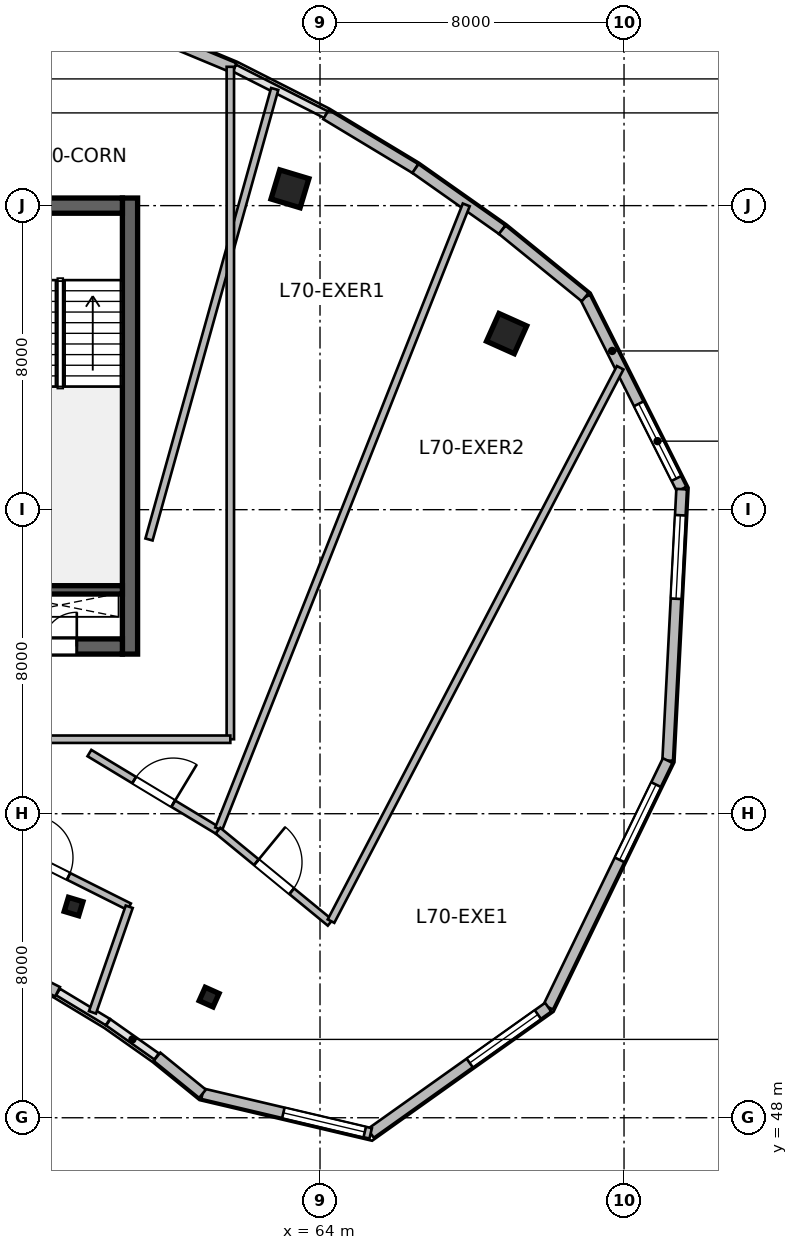
"""IFC4 building model, lengths in metres.
Left out: names, types, materials, properties, quantities, classifications, styles, units other than length and angle.
Written with IfcOpenShell. Run it as: python <this file> out.ifc"""

import sys

from ifc_helpers import new_model, si_unit, direction, frame, frame_2d, origin, origin_2d, place, context, subcontext, project, spatial, rectangle, i_section, extrude, source, transform, mapped, element, fill, save


model = new_model("IFC4")
c1 = context("Model", 3, precision=1e-05, world=origin(), true_north=direction((0.0, 1.0)))
c2 = subcontext(c1, "Body", "Model", "MODEL_VIEW")
j1 = project(units=[si_unit("LENGTHUNIT", "METRE"), si_unit("PLANEANGLEUNIT", "RADIAN")], contexts=[c1])
p1 = place(None, origin())
s1 = spatial("IfcSite", under=j1, at=p1, CompositionType="ELEMENT")
p2 = place(p1, origin())
s2 = spatial("IfcBuilding", under=s1, at=p2, CompositionType="ELEMENT")
p3 = place(p2, frame((0.0, 0.0, 287.4)))
s3 = spatial("IfcBuildingStorey", under=s2, at=p3, CompositionType="ELEMENT", Elevation=287.4)
m1 = source(origin(), c2, "Body", "SweptSolid", [
    extrude(rectangle(XDim=12.0, YDim=0.4, at=frame_2d((6.0, 0.0))), origin(), (0.0, 0.0, 1.0), 3.9),
])
p4 = place(p3, frame((59.0, 60.2, 0.0), z_axis=(0.0, 0.0, 1.0), x_axis=(0.0, 1.0, 0.0)))
e1 = element("IfcWall", 1, at=p4, inside=s3, PredefinedType="SHEAR", context=c2, shape_type="MappedRepresentation", body=[
    mapped(m1, transform((0.0, 0.0, 0.0), scale=1.0)),
])
m2 = source(origin(), c2, "Body", "SweptSolid", [
    extrude(rectangle(XDim=21.6, YDim=0.4, at=frame_2d((10.8, 0.0))), origin(), (0.0, 0.0, 1.0), 3.9),
])
p5 = place(p3, frame((37.2, 60.4, 0.0), z_axis=(0.0, 0.0, 1.0), x_axis=(1.0, 0.0, 0.0)))
e2 = element("IfcWall", 2, at=p5, inside=s3, PredefinedType="SHEAR", context=c2, shape_type="MappedRepresentation", body=[
    mapped(m2, transform((0.0, 0.0, 0.0), scale=1.0)),
])
p6 = place(p5, frame((1.1, 0.0, 0.0)))
e3 = element("IfcOpeningElement", 3, at=p6, cuts=e2, PredefinedType="OPENING", context=c2, shape_type="SweptSolid", body=[
    extrude(rectangle(XDim=1.15, YDim=2.15, at=frame_2d((0.575, 1.075))), frame((0.0, 0.21, 0.0), z_axis=(0.0, -1.0, 0.0), x_axis=(1.0, 0.0, 0.0)), (0.0, 0.0, 1.0), 0.42),
])
p7 = place(p5, frame((19.5, 0.0, 0.0)))
e4 = element("IfcOpeningElement", 4, at=p7, cuts=e2, PredefinedType="OPENING", context=c2, shape_type="SweptSolid", body=[
    extrude(rectangle(XDim=0.9, YDim=2.1, at=frame_2d((0.45, 1.05))), frame((0.0, 0.21, 0.0), z_axis=(0.0, -1.0, 0.0), x_axis=(1.0, 0.0, 0.0)), (0.0, 0.0, 1.0), 0.42),
])
p8 = place(p5, frame((12.02, 0.0, 0.0)))
e5 = element("IfcOpeningElement", 5, at=p8, cuts=e2, PredefinedType="OPENING", context=c2, shape_type="SweptSolid", body=[
    extrude(rectangle(XDim=1.6, YDim=2.15, at=frame_2d((0.8, 1.075))), frame((0.0, 0.21, 0.0), z_axis=(0.0, -1.0, 0.0), x_axis=(1.0, 0.0, 0.0)), (0.0, 0.0, 1.0), 0.42),
])
p9 = place(p3, frame((37.2, 72.0, 0.0), z_axis=(0.0, 0.0, 1.0), x_axis=(1.0, 0.0, 0.0)))
e6 = element("IfcWall", 6, at=p9, inside=s3, PredefinedType="SHEAR", context=c2, shape_type="MappedRepresentation", body=[
    mapped(m2, transform((0.0, 0.0, 0.0), scale=1.0)),
])
p10 = place(p9, frame((1.2, 0.0, 0.0)))
e7 = element("IfcOpeningElement", 7, at=p10, cuts=e6, PredefinedType="OPENING", context=c2, shape_type="SweptSolid", body=[
    extrude(rectangle(XDim=0.9, YDim=2.1, at=frame_2d((0.45, 1.05))), frame((0.0, 0.21, 0.0), z_axis=(0.0, -1.0, 0.0), x_axis=(1.0, 0.0, 0.0)), (0.0, 0.0, 1.0), 0.42),
])
p11 = place(p9, frame((14.7, 0.0, 0.0)))
e8 = element("IfcOpeningElement", 8, at=p11, cuts=e6, PredefinedType="OPENING", context=c2, shape_type="SweptSolid", body=[
    extrude(rectangle(XDim=1.2, YDim=2.15, at=frame_2d((0.6, 1.075))), frame((0.0, 0.21, 0.0), z_axis=(0.0, -1.0, 0.0), x_axis=(1.0, 0.0, 0.0)), (0.0, 0.0, 1.0), 0.42),
])
p12 = place(p9, frame((4.15, 0.0, 0.0)))
e9 = element("IfcOpeningElement", 9, at=p12, cuts=e6, PredefinedType="OPENING", context=c2, shape_type="SweptSolid", body=[
    extrude(rectangle(XDim=1.3, YDim=2.15, at=frame_2d((0.65, 1.075))), frame((0.0, 0.21, 0.0), z_axis=(0.0, -1.0, 0.0), x_axis=(1.0, 0.0, 0.0)), (0.0, 0.0, 1.0), 0.42),
])
p13 = place(p9, frame((7.1, 0.0, 0.0)))
e10 = element("IfcOpeningElement", 10, at=p13, cuts=e6, PredefinedType="OPENING", context=c2, shape_type="SweptSolid", body=[
    extrude(rectangle(XDim=0.9, YDim=2.1, at=frame_2d((0.45, 1.05))), frame((0.0, 0.21, 0.0), z_axis=(0.0, -1.0, 0.0), x_axis=(1.0, 0.0, 0.0)), (0.0, 0.0, 1.0), 0.42),
])
m3 = source(origin(), c2, "Body", "SweptSolid", [
    extrude(rectangle(XDim=3.27, YDim=0.22, at=frame_2d((1.635, 0.0))), origin(), (0.0, 0.0, 1.0), 3.9),
])
p14 = place(p3, frame((55.53, 61.89, 0.0), z_axis=(0.0, 0.0, 1.0), x_axis=(1.0, 0.0, 0.0)))
e11 = element("IfcWall", 11, at=p14, inside=s3, PredefinedType="SHEAR", context=c2, shape_type="MappedRepresentation", body=[
    mapped(m3, transform((0.0, 0.0, 0.0), scale=1.0)),
])
m4 = source(origin(), c2, "Body", "SweptSolid", [
    extrude(i_section(OverallWidth=0.399, OverallDepth=0.387, WebThickness=0.021, FlangeThickness=0.033, at=origin_2d()), origin(), (0.0, 0.0, 1.0), 3.9),
])
p15 = place(p3, frame((57.515, 53.558, 0.0), z_axis=(0.0, 0.0, 1.0), x_axis=(0.288697611798, 0.957420330337, 0.0)))
e12 = element("IfcColumn", 12, at=p15, inside=s3, PredefinedType="COLUMN", context=c2, shape_type="MappedRepresentation", body=[
    mapped(m4, transform((0.0, 0.0, 0.0), scale=1.0)),
])
m5 = source(origin(), c2, "Body", "SweptSolid", [
    extrude(rectangle(XDim=0.8, YDim=0.8, at=origin_2d()), origin(), (0.0, 0.0, 1.0), 3.9),
])
p16 = place(p3, frame((63.209, 72.442, 0.0), z_axis=(0.0, 0.0, 1.0), x_axis=(0.288697611798, 0.957420330337, 0.0)))
e13 = element("IfcColumn", 13, at=p16, inside=s3, PredefinedType="COLUMN", context=c2, shape_type="MappedRepresentation", body=[
    mapped(m5, transform((0.0, 0.0, 0.0), scale=1.0)),
])
p17 = place(p3, frame((61.082, 51.175, 0.0), z_axis=(0.0, 0.0, 1.0), x_axis=(0.409126902895, 0.912477494148, 0.0)))
e14 = element("IfcColumn", 14, at=p17, inside=s3, PredefinedType="COLUMN", context=c2, shape_type="MappedRepresentation", body=[
    mapped(m4, transform((0.0, 0.0, 0.0), scale=1.0)),
])
p18 = place(p3, frame((68.91, 68.633, 0.0), z_axis=(0.0, 0.0, 1.0), x_axis=(0.409126902895, 0.912477494148, 0.0)))
e15 = element("IfcColumn", 15, at=p18, inside=s3, PredefinedType="COLUMN", context=c2, shape_type="MappedRepresentation", body=[
    mapped(m5, transform((0.0, 0.0, 0.0), scale=1.0)),
])
m6 = source(origin(), c2, "Body", "SweptSolid", [
    extrude(rectangle(XDim=5.653, YDim=0.28, at=frame_2d((2.827, 0.0))), origin(), (0.0, 0.0, 1.0), 3.64),
])
p19 = place(p3, frame((70.976, 69.591, 0.0), z_axis=(0.0, 0.0, 1.0), x_axis=(0.449302555419, -0.893379658205, 0.0)))
e16 = element("IfcWall", 16, at=p19, inside=s3, PredefinedType="SOLIDWALL", context=c2, shape_type="MappedRepresentation", body=[
    mapped(m6, transform((0.0, 0.0, 0.0), scale=1.0)),
])
p20 = place(p19, frame((3.14, 0.0, 0.95)))
e17 = element("IfcOpeningElement", 17, at=p20, cuts=e16, PredefinedType="OPENING", context=c2, shape_type="SweptSolid", body=[
    extrude(rectangle(XDim=2.2, YDim=2.1, at=frame_2d((1.1, 1.05))), frame((0.0, 0.15, 0.0), z_axis=(0.0, -1.0, 0.0), x_axis=(1.0, 0.0, 0.0)), (0.0, 0.0, 1.0), 0.3),
])
m7 = source(origin(), c2, "Body", "SweptSolid", [
    extrude(rectangle(XDim=7.151, YDim=0.28, at=frame_2d((3.576, 0.0))), origin(), (0.0, 0.0, 1.0), 3.64),
])
p21 = place(p3, frame((73.516, 64.54, 0.0), z_axis=(0.0, 0.0, 1.0), x_axis=(-0.051449614265, -0.998675591567, 0.0)))
e18 = element("IfcWall", 18, at=p21, inside=s3, PredefinedType="SOLIDWALL", context=c2, shape_type="MappedRepresentation", body=[
    mapped(m7, transform((0.0, 0.0, 0.0), scale=1.0)),
])
p22 = place(p21, frame((0.688, 0.0, 0.95)))
e19 = element("IfcOpeningElement", 19, at=p22, cuts=e18, PredefinedType="OPENING", context=c2, shape_type="SweptSolid", body=[
    extrude(rectangle(XDim=2.2, YDim=2.1, at=frame_2d((1.1, 1.05))), frame((0.0, 0.15, 0.0), z_axis=(0.0, -1.0, 0.0), x_axis=(1.0, 0.0, 0.0)), (0.0, 0.0, 1.0), 0.3),
])
m8 = source(origin(), c2, "Body", "SweptSolid", [
    extrude(rectangle(XDim=7.211, YDim=0.28, at=frame_2d((3.606, 0.0))), origin(), (0.0, 0.0, 1.0), 3.64),
])
p23 = place(p3, frame((73.148, 57.399, 0.0), z_axis=(0.0, 0.0, 1.0), x_axis=(-0.436088263006, -0.899903898685, 0.0)))
e20 = element("IfcWall", 20, at=p23, inside=s3, PredefinedType="SOLIDWALL", context=c2, shape_type="MappedRepresentation", body=[
    mapped(m8, transform((0.0, 0.0, 0.0), scale=1.0)),
])
p24 = place(p23, frame((0.703, 0.0, 0.95)))
e21 = element("IfcOpeningElement", 21, at=p24, cuts=e20, PredefinedType="OPENING", context=c2, shape_type="SweptSolid", body=[
    extrude(rectangle(XDim=2.2, YDim=2.1, at=frame_2d((1.1, 1.05))), frame((0.0, 0.15, 0.0), z_axis=(0.0, -1.0, 0.0), x_axis=(1.0, 0.0, 0.0)), (0.0, 0.0, 1.0), 0.3),
])
m9 = source(origin(), c2, "Body", "SweptSolid", [
    extrude(rectangle(XDim=5.731, YDim=0.28, at=frame_2d((2.865, 0.0))), origin(), (0.0, 0.0, 1.0), 3.64),
])
p25 = place(p3, frame((70.004, 50.909, 0.0), z_axis=(0.0, 0.0, 1.0), x_axis=(-0.815021045908, -0.579431354629, 0.0)))
e22 = element("IfcWall", 22, at=p25, inside=s3, PredefinedType="SOLIDWALL", context=c2, shape_type="MappedRepresentation", body=[
    mapped(m9, transform((0.0, 0.0, 0.0), scale=1.0)),
])
p26 = place(p25, frame((0.333, 0.0, 0.95)))
e23 = element("IfcOpeningElement", 23, at=p26, cuts=e22, PredefinedType="OPENING", context=c2, shape_type="SweptSolid", body=[
    extrude(rectangle(XDim=2.2, YDim=2.1, at=frame_2d((1.1, 1.05))), frame((0.0, 0.15, 0.0), z_axis=(0.0, -1.0, 0.0), x_axis=(1.0, 0.0, 0.0)), (0.0, 0.0, 1.0), 0.3),
])
m10 = source(origin(), c2, "Body", "SweptSolid", [
    extrude(rectangle(XDim=4.547, YDim=0.28, at=frame_2d((2.273, 0.0))), origin(), (0.0, 0.0, 1.0), 3.64),
])
p27 = place(p3, frame((65.333, 47.589, 0.0), z_axis=(0.0, 0.0, 1.0), x_axis=(-0.973332593516, 0.229398479505, 0.0)))
e24 = element("IfcWall", 24, at=p27, inside=s3, PredefinedType="SOLIDWALL", context=c2, shape_type="MappedRepresentation", body=[
    mapped(m10, transform((0.0, 0.0, 0.0), scale=1.0)),
])
p28 = place(p27, frame((0.16, 0.0, 0.95)))
e25 = element("IfcOpeningElement", 25, at=p28, cuts=e24, PredefinedType="OPENING", context=c2, shape_type="SweptSolid", body=[
    extrude(rectangle(XDim=2.2, YDim=2.1, at=frame_2d((1.1, 1.05))), frame((0.0, 0.15, 0.0), z_axis=(0.0, -1.0, 0.0), x_axis=(1.0, 0.0, 0.0)), (0.0, 0.0, 1.0), 0.3),
])
m11 = source(origin(), c2, "Body", "SweptSolid", [
    extrude(rectangle(XDim=1.543, YDim=0.28, at=frame_2d((0.772, 0.0))), origin(), (0.0, 0.0, 1.0), 3.64),
])
p29 = place(p3, frame((60.908, 48.632, 0.0), z_axis=(0.0, 0.0, 1.0), x_axis=(-0.77582846857, 0.63094388606, 0.0)))
e26 = element("IfcWall", 26, at=p29, inside=s3, PredefinedType="SOLIDWALL", context=c2, shape_type="MappedRepresentation", body=[
    mapped(m11, transform((0.0, 0.0, 0.0), scale=1.0)),
])
m12 = source(origin(), c2, "Body", "SweptSolid", [
    extrude(rectangle(XDim=1.509, YDim=0.28, at=frame_2d((0.754, 0.0))), origin(), (0.0, 0.0, 1.0), 3.64),
])
p30 = place(p3, frame((57.094, 51.315, 0.0), z_axis=(0.0, 0.0, 1.0), x_axis=(-0.89169189228, 0.452642871635, 0.0)))
e27 = element("IfcWall", 27, at=p30, inside=s3, PredefinedType="SOLIDWALL", context=c2, shape_type="MappedRepresentation", body=[
    mapped(m12, transform((0.0, 0.0, 0.0), scale=1.0)),
])
m13 = source(origin(), c2, "Body", "SweptSolid", [
    extrude(rectangle(XDim=2.668, YDim=0.28, at=frame_2d((1.334, 0.0))), origin(), (0.0, 0.0, 1.0), 3.64),
])
p31 = place(p3, frame((59.281, 76.645, 0.0), z_axis=(0.0, 0.0, 1.0), x_axis=(0.923290633029, -0.384102078828, 0.0)))
e28 = element("IfcWall", 28, at=p31, inside=s3, PredefinedType="SOLIDWALL", context=c2, shape_type="MappedRepresentation", body=[
    mapped(m13, transform((0.0, 0.0, 0.0), scale=1.0)),
])
m14 = source(origin(), c2, "Body", "SweptSolid", [
    extrude(rectangle(XDim=2.748, YDim=0.28, at=frame_2d((1.374, 0.0))), origin(), (0.0, 0.0, 1.0), 3.64),
])
p32 = place(p3, frame((64.157, 74.396, 0.0), z_axis=(0.0, 0.0, 1.0), x_axis=(0.856149718453, -0.516727838996, 0.0)))
e29 = element("IfcWall", 29, at=p32, inside=s3, PredefinedType="SOLIDWALL", context=c2, shape_type="MappedRepresentation", body=[
    mapped(m14, transform((0.0, 0.0, 0.0), scale=1.0)),
])
m15 = source(origin(), c2, "Body", "SweptSolid", [
    extrude(rectangle(XDim=2.795, YDim=0.28, at=frame_2d((1.397, 0.0))), origin(), (0.0, 0.0, 1.0), 3.64),
])
p33 = place(p3, frame((66.51, 72.975, 0.0), z_axis=(0.0, 0.0, 1.0), x_axis=(0.817265517835, -0.576261289136, 0.0)))
e30 = element("IfcWall", 30, at=p33, inside=s3, PredefinedType="SOLIDWALL", context=c2, shape_type="MappedRepresentation", body=[
    mapped(m15, transform((0.0, 0.0, 0.0), scale=1.0)),
])
m16 = source(origin(), c2, "Body", "SweptSolid", [
    extrude(rectangle(XDim=2.812, YDim=0.28, at=frame_2d((1.406, 0.0))), origin(), (0.0, 0.0, 1.0), 3.64),
])
p34 = place(p3, frame((68.795, 71.365, 0.0), z_axis=(0.0, 0.0, 1.0), x_axis=(0.775880230716, -0.630880232361, 0.0)))
e31 = element("IfcWall", 31, at=p34, inside=s3, PredefinedType="SOLIDWALL", context=c2, shape_type="MappedRepresentation", body=[
    mapped(m16, transform((0.0, 0.0, 0.0), scale=1.0)),
])
m17 = source(origin(), c2, "Body", "SweptSolid", [
    extrude(rectangle(XDim=4.271, YDim=0.195, at=frame_2d((2.135, 0.0))), origin(), (0.0, 0.0, 1.0), 3.64),
])
p35 = place(p3, frame((55.161, 55.465, 0.0), z_axis=(0.0, 0.0, 1.0), x_axis=(0.894061035522, -0.447945158207, 0.0)))
e32 = element("IfcWall", 32, at=p35, inside=s3, PredefinedType="PARTITIONING", context=c2, shape_type="MappedRepresentation", body=[
    mapped(m17, transform((0.0, 0.0, 0.0), scale=1.0)),
])
p36 = place(p35, frame((1.385, 0.0, 0.0)))
e33 = element("IfcOpeningElement", 33, at=p36, cuts=e32, PredefinedType="OPENING", context=c2, shape_type="SweptSolid", body=[
    extrude(rectangle(XDim=1.1, YDim=2.15, at=frame_2d((0.55, 1.075))), frame((0.0, 0.107, 0.0), z_axis=(0.0, -1.0, 0.0), x_axis=(1.0, 0.0, 0.0)), (0.0, 0.0, 1.0), 0.215),
])
m18 = source(origin(), c2, "Body", "SweptSolid", [
    extrude(rectangle(XDim=2.942, YDim=0.195, at=frame_2d((1.471, 0.0))), origin(), (0.0, 0.0, 1.0), 3.64),
])
p37 = place(p3, frame((58.013, 50.773, 0.0), z_axis=(0.0, 0.0, 1.0), x_axis=(0.328623620494, 0.944460965871, 0.0)))
e34 = element("IfcWall", 34, at=p37, inside=s3, PredefinedType="PARTITIONING", context=c2, shape_type="MappedRepresentation", body=[
    mapped(m18, transform((0.0, 0.0, 0.0), scale=1.0)),
])
m19 = source(origin(), c2, "Body", "SweptSolid", [
    extrude(rectangle(XDim=3.951, YDim=0.195, at=frame_2d((1.975, 0.0))), origin(), (0.0, 0.0, 1.0), 3.64),
])
p38 = place(p3, frame((57.932, 57.596, 0.0), z_axis=(0.0, 0.0, 1.0), x_axis=(0.856137696849, -0.51674775668, 0.0)))
e35 = element("IfcWall", 35, at=p38, inside=s3, PredefinedType="PARTITIONING", context=c2, shape_type="MappedRepresentation", body=[
    mapped(m19, transform((0.0, 0.0, 0.0), scale=1.0)),
])
p39 = place(p38, frame((1.375, 0.0, 0.0)))
e36 = element("IfcOpeningElement", 36, at=p39, cuts=e35, PredefinedType="OPENING", context=c2, shape_type="SweptSolid", body=[
    extrude(rectangle(XDim=1.2, YDim=2.15, at=frame_2d((0.6, 1.075))), frame((0.0, 0.107, 0.0), z_axis=(0.0, -1.0, 0.0), x_axis=(1.0, 0.0, 0.0)), (0.0, 0.0, 1.0), 0.215),
])
m20 = source(origin(), c2, "Body", "SweptSolid", [
    extrude(rectangle(XDim=12.307, YDim=0.195, at=frame_2d((6.153, 0.0))), origin(), (0.0, 0.0, 1.0), 3.64),
])
p40 = place(p3, frame((59.5, 63.216, 0.0), z_axis=(0.0, 0.0, 1.0), x_axis=(0.268768150257, 0.96320490105, 0.0)))
e37 = element("IfcWall", 37, at=p40, inside=s3, PredefinedType="PARTITIONING", context=c2, shape_type="MappedRepresentation", body=[
    mapped(m20, transform((0.0, 0.0, 0.0), scale=1.0)),
])
m21 = source(origin(), c2, "Body", "SweptSolid", [
    extrude(rectangle(XDim=17.664, YDim=0.195, at=frame_2d((8.832, 0.0))), origin(), (0.0, 0.0, 1.0), 3.64),
])
p41 = place(p3, frame((61.333, 55.602, 0.0), z_axis=(0.0, 0.0, 1.0), x_axis=(0.368827513738, 0.929497856431, 0.0)))
e38 = element("IfcWall", 38, at=p41, inside=s3, PredefinedType="PARTITIONING", context=c2, shape_type="MappedRepresentation", body=[
    mapped(m21, transform((0.0, 0.0, 0.0), scale=1.0)),
])
m22 = source(origin(), c2, "Body", "SweptSolid", [
    extrude(rectangle(XDim=3.82, YDim=0.195, at=frame_2d((1.91, 0.0))), origin(), (0.0, 0.0, 1.0), 3.64),
])
p42 = place(p3, frame((61.314, 55.554, 0.0), z_axis=(0.0, 0.0, 1.0), x_axis=(0.772805728445, -0.63464266015, 0.0)))
e39 = element("IfcWall", 39, at=p42, inside=s3, PredefinedType="PARTITIONING", context=c2, shape_type="MappedRepresentation", body=[
    mapped(m22, transform((0.0, 0.0, 0.0), scale=1.0)),
])
p43 = place(p42, frame((1.31, 0.0, 0.0)))
e40 = element("IfcOpeningElement", 40, at=p43, cuts=e39, PredefinedType="OPENING", context=c2, shape_type="SweptSolid", body=[
    extrude(rectangle(XDim=1.2, YDim=2.15, at=frame_2d((0.6, 1.075))), frame((0.0, 0.107, 0.0), z_axis=(0.0, -1.0, 0.0), x_axis=(1.0, 0.0, 0.0)), (0.0, 0.0, 1.0), 0.215),
])
m23 = source(origin(), c2, "Body", "SweptSolid", [
    extrude(rectangle(XDim=16.43, YDim=0.195, at=frame_2d((8.215, 0.0))), origin(), (0.0, 0.0, 1.0), 3.64),
])
p44 = place(p3, frame((64.29, 53.174, 0.0), z_axis=(0.0, 0.0, 1.0), x_axis=(0.463119459371, 0.886295868405, 0.0)))
e41 = element("IfcWall", 41, at=p44, inside=s3, PredefinedType="PARTITIONING", context=c2, shape_type="MappedRepresentation", body=[
    mapped(m23, transform((0.0, 0.0, 0.0), scale=1.0)),
])
m24 = source(origin(), c2, "Body", "SweptSolid", [
    extrude(rectangle(XDim=17.693, YDim=0.195, at=frame_2d((8.847, 0.0))), origin(), (0.0, 0.0, 1.0), 3.64),
])
p45 = place(p3, frame((61.64, 57.96, 0.0), z_axis=(0.0, 0.0, 1.0), x_axis=(0.0, 1.0, 0.0)))
e42 = element("IfcWall", 42, at=p45, inside=s3, PredefinedType="PARTITIONING", context=c2, shape_type="MappedRepresentation", body=[
    mapped(m24, transform((0.0, 0.0, 0.0), scale=1.0)),
])
m25 = source(origin(), c2, "Body", "SweptSolid", [
    extrude(rectangle(XDim=12.39, YDim=0.195, at=frame_2d((6.195, 0.0))), origin(), (0.0, 0.0, 1.0), 3.64),
])
p46 = place(p3, frame((49.25, 57.96, 0.0), z_axis=(0.0, 0.0, 1.0), x_axis=(1.0, 0.0, 0.0)))
e43 = element("IfcWall", 43, at=p46, inside=s3, PredefinedType="PARTITIONING", context=c2, shape_type="MappedRepresentation", body=[
    mapped(m25, transform((0.0, 0.0, 0.0), scale=1.0)),
])
m26 = source(origin(), c2, "Body", "SweptSolid", [
    extrude(rectangle(XDim=2.2, YDim=2.1, at=frame_2d((1.1, 1.05))), frame((0.0, 0.03, 0.0), z_axis=(0.0, -1.0, 0.0), x_axis=(1.0, 0.0, 0.0)), (0.0, 0.0, 1.0), 0.06),
])
p47 = place(p20, origin())
e44 = element("IfcWindow", 44, at=p47, inside=s3, PartitioningType="TRIPLE_PANEL_VERTICAL", PredefinedType="WINDOW", context=c2, shape_type="MappedRepresentation", body=[
    mapped(m26, transform((0.0, 0.0, 0.0), scale=1.0)),
])
fill(e17, e44)
p48 = place(p22, origin())
e45 = element("IfcWindow", 45, at=p48, inside=s3, PartitioningType="TRIPLE_PANEL_VERTICAL", PredefinedType="WINDOW", context=c2, shape_type="MappedRepresentation", body=[
    mapped(m26, transform((0.0, 0.0, 0.0), scale=1.0)),
])
fill(e19, e45)
p49 = place(p24, origin())
e46 = element("IfcWindow", 46, at=p49, inside=s3, PartitioningType="TRIPLE_PANEL_VERTICAL", PredefinedType="WINDOW", context=c2, shape_type="MappedRepresentation", body=[
    mapped(m26, transform((0.0, 0.0, 0.0), scale=1.0)),
])
fill(e21, e46)
p50 = place(p26, origin())
e47 = element("IfcWindow", 47, at=p50, inside=s3, PartitioningType="TRIPLE_PANEL_VERTICAL", PredefinedType="WINDOW", context=c2, shape_type="MappedRepresentation", body=[
    mapped(m26, transform((0.0, 0.0, 0.0), scale=1.0)),
])
fill(e23, e47)
p51 = place(p28, origin())
e48 = element("IfcWindow", 48, at=p51, inside=s3, PartitioningType="TRIPLE_PANEL_VERTICAL", PredefinedType="WINDOW", context=c2, shape_type="MappedRepresentation", body=[
    mapped(m26, transform((0.0, 0.0, 0.0), scale=1.0)),
])
fill(e25, e48)
m27 = source(origin(), c2, "Body", "SweptSolid", [
    extrude(rectangle(XDim=0.9, YDim=2.1, at=frame_2d((0.45, 1.05))), frame((0.0, 0.025, 0.0), z_axis=(0.0, -1.0, 0.0), x_axis=(1.0, 0.0, 0.0)), (0.0, 0.0, 1.0), 0.05),
])
p52 = place(p7, origin())
e49 = element("IfcDoor", 49, at=p52, inside=s3, OperationType="SINGLE_SWING_RIGHT", PredefinedType="DOOR", context=c2, shape_type="MappedRepresentation", body=[
    mapped(m27, transform((0.0, 0.0, 0.0), scale=1.0)),
])
fill(e4, e49)
m28 = source(origin(), c2, "Body", "SweptSolid", [
    extrude(rectangle(XDim=1.1, YDim=2.15, at=frame_2d((0.55, 1.075))), frame((0.0, 0.025, 0.0), z_axis=(0.0, -1.0, 0.0), x_axis=(1.0, 0.0, 0.0)), (0.0, 0.0, 1.0), 0.05),
])
p53 = place(p36, origin())
e50 = element("IfcDoor", 50, at=p53, inside=s3, OperationType="SINGLE_SWING_LEFT", PredefinedType="DOOR", context=c2, shape_type="MappedRepresentation", body=[
    mapped(m28, transform((0.0, 0.0, 0.0), scale=1.0)),
])
fill(e33, e50)
m29 = source(origin(), c2, "Body", "SweptSolid", [
    extrude(rectangle(XDim=1.2, YDim=2.15, at=frame_2d((0.6, 1.075))), frame((0.0, 0.025, 0.0), z_axis=(0.0, -1.0, 0.0), x_axis=(1.0, 0.0, 0.0)), (0.0, 0.0, 1.0), 0.05),
])
p54 = place(p39, origin())
e51 = element("IfcDoor", 51, at=p54, inside=s3, OperationType="SINGLE_SWING_RIGHT", PredefinedType="DOOR", context=c2, shape_type="MappedRepresentation", body=[
    mapped(m29, transform((0.0, 0.0, 0.0), scale=1.0)),
])
fill(e36, e51)
p55 = place(p43, origin())
e52 = element("IfcDoor", 52, at=p55, inside=s3, OperationType="SINGLE_SWING_LEFT", PredefinedType="DOOR", context=c2, shape_type="MappedRepresentation", body=[
    mapped(m29, transform((0.0, 0.0, 0.0), scale=1.0)),
])
fill(e40, e52)
save(model, sys.argv[1])
